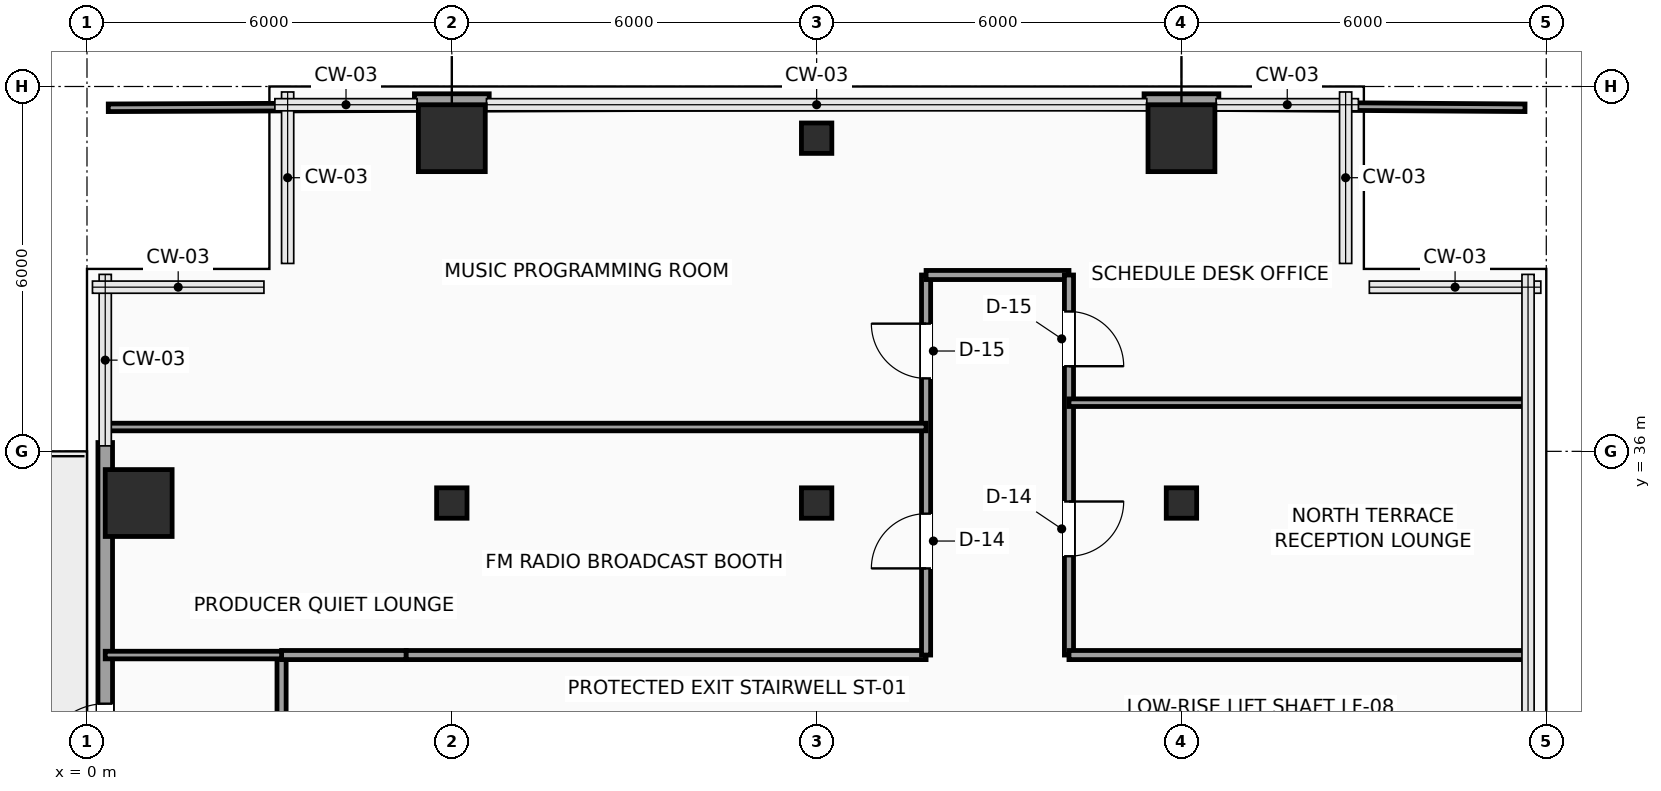
"""IFC4 building model, lengths in metres.
Left out: names, types, materials, properties, quantities, classifications, styles, units other than length and angle.
Written with IfcOpenShell. Run it as: python <this file> out.ifc"""

import sys

from ifc_helpers import new_model, si_unit, direction, frame, frame_2d, origin, origin_2d, place, context, subcontext, project, spatial, rectangle, hollow_rectangle, extrude, element, fill, save


model = new_model("IFC4")
c1 = context("Model", 3, precision=1e-05, world=origin(), true_north=direction((0.0, 1.0)))
c2 = subcontext(c1, "Body", "Model", "MODEL_VIEW")
j1 = project(units=[si_unit("LENGTHUNIT", "METRE"), si_unit("PLANEANGLEUNIT", "RADIAN")], contexts=[c1])
p1 = place(None, origin())
s1 = spatial("IfcSite", under=j1, at=p1, CompositionType="ELEMENT")
p2 = place(p1, origin())
s2 = spatial("IfcBuilding", under=s1, at=p2, CompositionType="ELEMENT")
p3 = place(p2, frame((0.0, 0.0, 103.35)))
s3 = spatial("IfcBuildingStorey", under=s2, at=p3, CompositionType="ELEMENT", Elevation=103.35)
p4 = place(p3, frame((0.85, 35.15, 0.0), z_axis=(0.0, 0.0, 1.0), x_axis=(1.0, 0.0, 0.0)))
e1 = element("IfcColumn", 1, at=p4, inside=s3, PredefinedType="COLUMN", context=c2, shape_type="SweptSolid", body=[
    extrude(rectangle(XDim=1.1, YDim=1.1, at=origin_2d()), origin(), (0.0, 0.0, 1.0), 3.75),
])
p5 = place(p3, frame((6.0, 35.15, 0.0), z_axis=(0.0, 0.0, 1.0), x_axis=(1.0, 0.0, 0.0)))
e2 = element("IfcColumn", 2, at=p5, inside=s3, PredefinedType="COLUMN", context=c2, shape_type="SweptSolid", body=[
    extrude(hollow_rectangle(XDim=0.5, YDim=0.5, WallThickness=0.025, InnerFilletRadius=0.025, OuterFilletRadius=0.04, at=origin_2d()), origin(), (0.0, 0.0, 1.0), 3.75),
])
p6 = place(p3, frame((6.0, 41.15, 0.0), z_axis=(0.0, 0.0, 1.0), x_axis=(1.0, 0.0, 0.0)))
e3 = element("IfcColumn", 3, at=p6, inside=s3, PredefinedType="COLUMN", context=c2, shape_type="SweptSolid", body=[
    extrude(rectangle(XDim=1.1, YDim=1.1, at=origin_2d()), origin(), (0.0, 0.0, 1.0), 3.75),
])
for number, where, z_axis, x_axis in (
    (4, (12.0, 35.15, 0.0), (0.0, 0.0, 1.0), (1.0, 0.0, 0.0)),
    (5, (12.0, 41.15, 0.0), (0.0, 0.0, 1.0), (1.0, 0.0, 0.0)),
    (6, (18.0, 35.15, 0.0), (0.0, 0.0, 1.0), (1.0, 0.0, 0.0)),
):
    element("IfcColumn", number, at=place(p3, frame(where, z_axis=z_axis, x_axis=x_axis)), inside=s3, PredefinedType="COLUMN", context=c2, shape_type="SweptSolid", body=[
        extrude(hollow_rectangle(XDim=0.5, YDim=0.5, WallThickness=0.025, InnerFilletRadius=0.025, OuterFilletRadius=0.04, at=origin_2d()), origin(), (0.0, 0.0, 1.0), 3.75),
    ])
p7 = place(p3, frame((18.0, 41.15, 0.0), z_axis=(0.0, 0.0, 1.0), x_axis=(1.0, 0.0, 0.0)))
e7 = element("IfcColumn", 7, at=p7, inside=s3, PredefinedType="COLUMN", context=c2, shape_type="SweptSolid", body=[
    extrude(rectangle(XDim=1.1, YDim=1.1, at=origin_2d()), origin(), (0.0, 0.0, 1.0), 3.75),
])
p8 = place(p3, frame((0.3, 26.855, 0.0), z_axis=(0.0, 0.0, 1.0), x_axis=(0.0, 1.0, 0.0)))
e8 = element("IfcWall", 8, at=p8, inside=s3, PredefinedType="SOLIDWALL", context=c2, shape_type="SweptSolid", body=[
    extrude(rectangle(XDim=9.29, YDim=0.24, at=frame_2d((4.645, 0.0))), origin(), (0.0, 0.0, 1.0), 3.525),
])
p9 = place(p8, frame((3.945, 0.0, 0.0)))
e9 = element("IfcOpeningElement", 9, at=p9, cuts=e8, PredefinedType="OPENING", context=c2, shape_type="SweptSolid", body=[
    extrude(rectangle(XDim=1.05, YDim=2.2, at=frame_2d((0.525, 1.1))), frame((0.0, 0.13, 0.0), z_axis=(0.0, -1.0, 0.0), x_axis=(1.0, 0.0, 0.0)), (0.0, 0.0, 1.0), 0.26),
])
for number, where, z_axis, x_axis in (
    (10, (5.385, 41.76, 0.0), (0.0, 0.0, 1.0), (1.0, 0.0, 0.0)),
    (11, (17.385, 41.76, 0.0), (0.0, 0.0, 1.0), (1.0, 0.0, 0.0)),
):
    element("IfcWall", number, at=place(p3, frame(where, z_axis=z_axis, x_axis=x_axis)), inside=s3, PredefinedType="SOLIDWALL", context=c2, shape_type="SweptSolid", body=[
        extrude(rectangle(XDim=1.23, YDim=0.24, at=frame_2d((0.615, 0.0))), origin(), (0.0, 0.0, 1.0), 3.525),
    ])
p10 = place(p3, frame((3.2, 30.25, 0.0), z_axis=(0.0, 0.0, 1.0), x_axis=(0.0, 1.0, 0.0)))
e12 = element("IfcWall", 12, at=p10, inside=s3, PredefinedType="PARTITIONING", context=c2, shape_type="SweptSolid", body=[
    extrude(rectangle(XDim=2.4, YDim=0.15, at=frame_2d((1.2, 0.0))), origin(), (0.0, 0.0, 1.0), 3.525),
])
p11 = place(p3, frame((3.2, 32.65, 0.0), z_axis=(0.0, 0.0, 1.0), x_axis=(1.0, 0.0, 0.0)))
e13 = element("IfcWall", 13, at=p11, inside=s3, PredefinedType="PARTITIONING", context=c2, shape_type="SweptSolid", body=[
    extrude(rectangle(XDim=2.05, YDim=0.15, at=frame_2d((1.025, 0.0))), origin(), (0.0, 0.0, 1.0), 3.525),
])
p12 = place(p3, frame((5.25, 32.65, 0.0), z_axis=(0.0, 0.0, 1.0), x_axis=(1.0, 0.0, 0.0)))
e14 = element("IfcWall", 14, at=p12, inside=s3, PredefinedType="PARTITIONING", context=c2, shape_type="SweptSolid", body=[
    extrude(rectangle(XDim=8.55, YDim=0.15, at=frame_2d((4.275, 0.0))), origin(), (0.0, 0.0, 1.0), 3.525),
])
p13 = place(p3, frame((13.8, 32.65, 0.0), z_axis=(0.0, 0.0, 1.0), x_axis=(0.0, 1.0, 0.0)))
e15 = element("IfcWall", 15, at=p13, inside=s3, PredefinedType="PARTITIONING", context=c2, shape_type="SweptSolid", body=[
    extrude(rectangle(XDim=6.25, YDim=0.15, at=frame_2d((3.125, 0.0))), origin(), (0.0, 0.0, 1.0), 3.525),
])
p14 = place(p13, frame((1.425, 0.0, 0.0)))
e16 = element("IfcOpeningElement", 16, at=p14, cuts=e15, PredefinedType="OPENING", context=c2, shape_type="SweptSolid", body=[
    extrude(rectangle(XDim=0.9, YDim=2.1, at=frame_2d((0.45, 1.05))), frame((0.0, 0.085, 0.0), z_axis=(0.0, -1.0, 0.0), x_axis=(1.0, 0.0, 0.0)), (0.0, 0.0, 1.0), 0.17),
])
p15 = place(p13, frame((4.55, 0.0, 0.0)))
e17 = element("IfcOpeningElement", 17, at=p15, cuts=e15, PredefinedType="OPENING", context=c2, shape_type="SweptSolid", body=[
    extrude(rectangle(XDim=0.9, YDim=2.1, at=frame_2d((0.45, 1.05))), frame((0.0, 0.085, 0.0), z_axis=(0.0, -1.0, 0.0), x_axis=(1.0, 0.0, 0.0)), (0.0, 0.0, 1.0), 0.17),
])
p16 = place(p3, frame((13.8, 38.9, 0.0), z_axis=(0.0, 0.0, 1.0), x_axis=(1.0, 0.0, 0.0)))
e18 = element("IfcWall", 18, at=p16, inside=s3, PredefinedType="PARTITIONING", context=c2, shape_type="SweptSolid", body=[
    extrude(rectangle(XDim=2.35, YDim=0.15, at=frame_2d((1.175, 0.0))), origin(), (0.0, 0.0, 1.0), 3.525),
])
p17 = place(p3, frame((16.15, 38.9, 0.0), z_axis=(0.0, 0.0, 1.0), x_axis=(0.0, -1.0, 0.0)))
e19 = element("IfcWall", 19, at=p17, inside=s3, PredefinedType="PARTITIONING", context=c2, shape_type="SweptSolid", body=[
    extrude(rectangle(XDim=6.25, YDim=0.15, at=frame_2d((3.125, 0.0))), origin(), (0.0, 0.0, 1.0), 3.525),
])
p18 = place(p17, frame((3.725, 0.0, 0.0)))
e20 = element("IfcOpeningElement", 20, at=p18, cuts=e19, PredefinedType="OPENING", context=c2, shape_type="SweptSolid", body=[
    extrude(rectangle(XDim=0.9, YDim=2.1, at=frame_2d((0.45, 1.05))), frame((0.0, 0.085, 0.0), z_axis=(0.0, -1.0, 0.0), x_axis=(1.0, 0.0, 0.0)), (0.0, 0.0, 1.0), 0.17),
])
p19 = place(p17, frame((0.6, 0.0, 0.0)))
e21 = element("IfcOpeningElement", 21, at=p19, cuts=e19, PredefinedType="OPENING", context=c2, shape_type="SweptSolid", body=[
    extrude(rectangle(XDim=0.9, YDim=2.1, at=frame_2d((0.45, 1.05))), frame((0.0, 0.085, 0.0), z_axis=(0.0, -1.0, 0.0), x_axis=(1.0, 0.0, 0.0)), (0.0, 0.0, 1.0), 0.17),
])
p20 = place(p3, frame((16.15, 32.65, 0.0), z_axis=(0.0, 0.0, 1.0), x_axis=(1.0, 0.0, 0.0)))
e22 = element("IfcWall", 22, at=p20, inside=s3, PredefinedType="PARTITIONING", context=c2, shape_type="SweptSolid", body=[
    extrude(rectangle(XDim=7.55, YDim=0.15, at=frame_2d((3.775, 0.0))), origin(), (0.0, 0.0, 1.0), 3.525),
])
p21 = place(p3, frame((0.3, 36.4, 0.0), z_axis=(0.0, 0.0, 1.0), x_axis=(1.0, 0.0, 0.0)))
e23 = element("IfcWall", 23, at=p21, inside=s3, PredefinedType="PARTITIONING", context=c2, shape_type="SweptSolid", body=[
    extrude(rectangle(XDim=13.5, YDim=0.125, at=frame_2d((6.75, 0.0))), origin(), (0.0, 0.0, 1.0), 3.525),
])
p22 = place(p3, frame((0.35, 41.65, 0.0), z_axis=(0.0, 0.0, 1.0), x_axis=(0.999993029832, 0.003733669364, 0.0)))
e24 = element("IfcWall", 24, at=p22, inside=s3, PredefinedType="PARTITIONING", context=c2, shape_type="SweptSolid", body=[
    extrude(rectangle(XDim=5.035, YDim=0.125, at=frame_2d((2.518, 0.0))), origin(), (0.0, 0.0, 1.0), 3.525),
])
p23 = place(p3, frame((6.615, 41.673, 0.0), z_axis=(0.0, 0.0, 1.0), x_axis=(0.99999314136, 0.003703678301, 0.0)))
e25 = element("IfcWall", 25, at=p23, inside=s3, PredefinedType="PARTITIONING", context=c2, shape_type="SweptSolid", body=[
    extrude(rectangle(XDim=7.185, YDim=0.125, at=frame_2d((3.593, 0.0))), origin(), (0.0, 0.0, 1.0), 3.525),
])
p24 = place(p3, frame((16.15, 36.8, 0.0), z_axis=(0.0, 0.0, 1.0), x_axis=(1.0, 0.0, 0.0)))
e26 = element("IfcWall", 26, at=p24, inside=s3, PredefinedType="PARTITIONING", context=c2, shape_type="SweptSolid", body=[
    extrude(rectangle(XDim=7.55, YDim=0.125, at=frame_2d((3.775, 0.0))), origin(), (0.0, 0.0, 1.0), 3.525),
])
p25 = place(p3, frame((16.15, 41.7, 0.0), z_axis=(0.0, 0.0, 1.0), x_axis=(0.99997872573, -0.006522889494, 0.0)))
e27 = element("IfcWall", 27, at=p25, inside=s3, PredefinedType="PARTITIONING", context=c2, shape_type="SweptSolid", body=[
    extrude(rectangle(XDim=1.235, YDim=0.125, at=frame_2d((0.618, 0.0))), origin(), (0.0, 0.0, 1.0), 3.525),
])
p26 = place(p3, frame((18.615, 41.684, 0.0), z_axis=(0.0, 0.0, 1.0), x_axis=(0.999977612278, -0.006691408161, 0.0)))
e28 = element("IfcWall", 28, at=p26, inside=s3, PredefinedType="PARTITIONING", context=c2, shape_type="SweptSolid", body=[
    extrude(rectangle(XDim=5.035, YDim=0.125, at=frame_2d((2.518, 0.0))), origin(), (0.0, 0.0, 1.0), 3.525),
])
p27 = place(p3, frame((0.3, 32.65, 0.0), z_axis=(0.0, 0.0, 1.0), x_axis=(1.0, 0.0, 0.0)))
e29 = element("IfcWall", 29, at=p27, inside=s3, PredefinedType="PARTITIONING", context=c2, shape_type="SweptSolid", body=[
    extrude(rectangle(XDim=2.9, YDim=0.125, at=frame_2d((1.45, 0.0))), origin(), (0.0, 0.0, 1.0), 3.525),
])
p28 = place(p9, origin())
e30 = element("IfcDoor", 30, at=p28, inside=s3, OperationType="SINGLE_SWING_LEFT", PredefinedType="DOOR", context=c2, shape_type="SweptSolid", body=[
    extrude(rectangle(XDim=1.05, YDim=2.2, at=frame_2d((0.525, 1.1))), frame((0.0, 0.025, 0.0), z_axis=(0.0, -1.0, 0.0), x_axis=(1.0, 0.0, 0.0)), (0.0, 0.0, 1.0), 0.05),
])
fill(e9, e30)
p29 = place(p14, origin())
e31 = element("IfcDoor", 31, at=p29, inside=s3, OperationType="SINGLE_SWING_LEFT", PredefinedType="DOOR", context=c2, shape_type="SweptSolid", body=[
    extrude(rectangle(XDim=0.9, YDim=2.1, at=frame_2d((0.45, 1.05))), frame((0.0, 0.025, 0.0), z_axis=(0.0, -1.0, 0.0), x_axis=(1.0, 0.0, 0.0)), (0.0, 0.0, 1.0), 0.05),
])
fill(e16, e31)
p30 = place(p15, origin())
e32 = element("IfcDoor", 32, at=p30, inside=s3, OperationType="SINGLE_SWING_RIGHT", PredefinedType="DOOR", context=c2, shape_type="SweptSolid", body=[
    extrude(rectangle(XDim=0.9, YDim=2.1, at=frame_2d((0.45, 1.05))), frame((0.0, 0.025, 0.0), z_axis=(0.0, -1.0, 0.0), x_axis=(1.0, 0.0, 0.0)), (0.0, 0.0, 1.0), 0.05),
])
fill(e17, e32)
p31 = place(p18, origin())
e33 = element("IfcDoor", 33, at=p31, inside=s3, OperationType="SINGLE_SWING_LEFT", PredefinedType="DOOR", context=c2, shape_type="SweptSolid", body=[
    extrude(rectangle(XDim=0.9, YDim=2.1, at=frame_2d((0.45, 1.05))), frame((0.0, 0.025, 0.0), z_axis=(0.0, -1.0, 0.0), x_axis=(1.0, 0.0, 0.0)), (0.0, 0.0, 1.0), 0.05),
])
fill(e20, e33)
p32 = place(p19, origin())
e34 = element("IfcDoor", 34, at=p32, inside=s3, OperationType="SINGLE_SWING_RIGHT", PredefinedType="DOOR", context=c2, shape_type="SweptSolid", body=[
    extrude(rectangle(XDim=0.9, YDim=2.1, at=frame_2d((0.45, 1.05))), frame((0.0, 0.025, 0.0), z_axis=(0.0, -1.0, 0.0), x_axis=(1.0, 0.0, 0.0)), (0.0, 0.0, 1.0), 0.05),
])
fill(e21, e34)
save(model, sys.argv[1])
